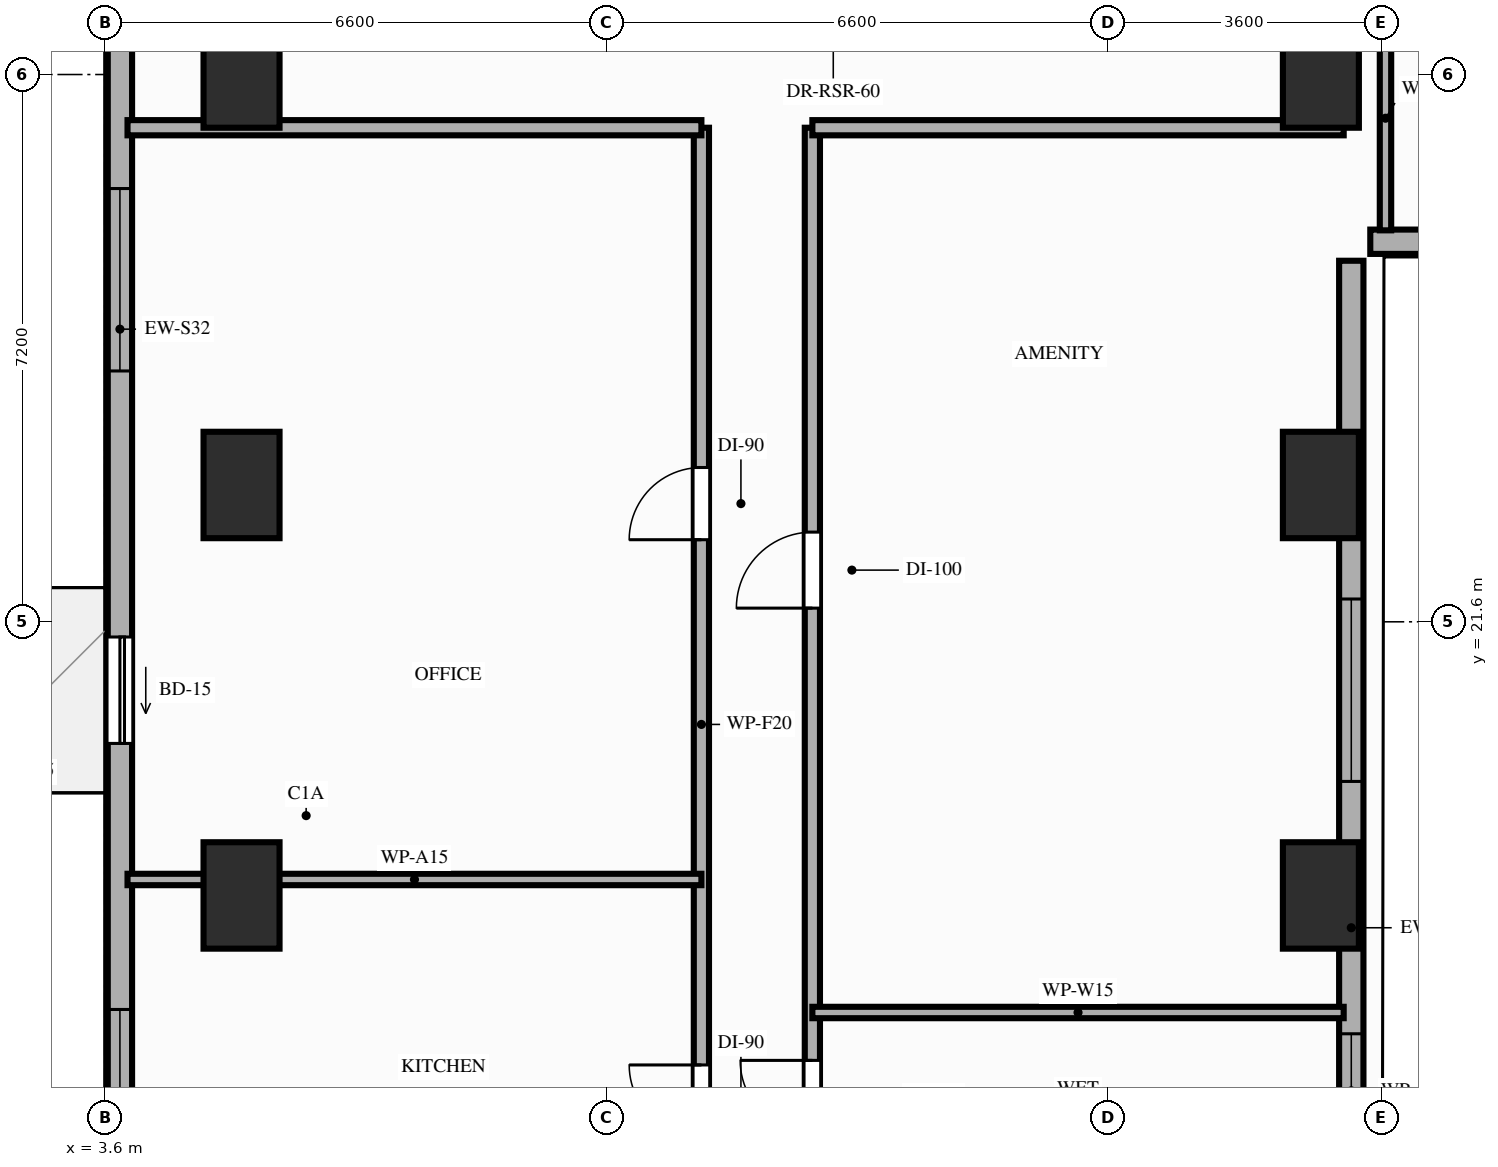
"""IFC4 building model, lengths in metres.
Left out: names, types, materials, properties, quantities, classifications, styles, units other than length and angle.
Written with IfcOpenShell. Run it as: python <this file> out.ifc"""

import sys

from ifc_helpers import new_model, si_unit, direction, frame, frame_2d, origin, origin_2d, place, context, subcontext, project, spatial, rectangle, extrude, element, fill, save


model = new_model("IFC4")
c1 = context("Model", 3, precision=1e-05, world=origin(), true_north=direction((0.0, 1.0)))
c2 = subcontext(c1, "Body", "Model", "MODEL_VIEW")
j1 = project(units=[si_unit("LENGTHUNIT", "METRE"), si_unit("PLANEANGLEUNIT", "RADIAN")], contexts=[c1])
p1 = place(None, origin())
s1 = spatial("IfcSite", under=j1, at=p1, CompositionType="ELEMENT")
p2 = place(p1, origin())
s2 = spatial("IfcBuilding", under=s1, at=p2, CompositionType="ELEMENT")
p3 = place(p2, frame((0.0, 0.0, 39.8)))
s3 = spatial("IfcBuildingStorey", under=s2, at=p3, CompositionType="ELEMENT", Elevation=39.8)
for number, where, z_axis, x_axis in (
    (1, (5.4, 18.0, 0.0), (0.0, 0.0, 1.0), (1.0, 0.0, 0.0)),
    (2, (19.6, 18.0, 0.0), (0.0, 0.0, 1.0), (1.0, 0.0, 0.0)),
    (3, (5.4, 23.4, 0.0), (0.0, 0.0, 1.0), (1.0, 0.0, 0.0)),
    (4, (19.6, 23.4, 0.0), (0.0, 0.0, 1.0), (1.0, 0.0, 0.0)),
    (5, (5.4, 28.8, 0.0), (0.0, 0.0, 1.0), (1.0, 0.0, 0.0)),
    (6, (19.6, 28.8, 0.0), (0.0, 0.0, 1.0), (1.0, 0.0, 0.0)),
):
    element("IfcColumn", number, at=place(p3, frame(where, z_axis=z_axis, x_axis=x_axis)), inside=s3, PredefinedType="COLUMN", context=c2, shape_type="SweptSolid", body=[
        extrude(rectangle(XDim=1.0, YDim=1.4, at=origin_2d()), origin(), (0.0, 0.0, 1.0), 3.8),
    ])
p4 = place(p3, frame((3.8, 42.1, 0.0), z_axis=(0.0, 0.0, 1.0), x_axis=(0.0, -1.0, 0.0)))
e7 = element("IfcWall", 7, at=p4, inside=s3, PredefinedType="STANDARD", context=c2, shape_type="SweptSolid", body=[
    extrude(rectangle(XDim=33.3, YDim=0.32, at=frame_2d((16.65, 0.0))), origin(), (0.0, 0.0, 1.0), 3.3),
])
p5 = place(p4, frame((20.7, 0.0, 0.0)))
e8 = element("IfcOpeningElement", 8, at=p5, cuts=e7, PredefinedType="OPENING", context=c2, shape_type="SweptSolid", body=[
    extrude(rectangle(XDim=1.4, YDim=2.1, at=frame_2d((0.7, 1.05))), frame((0.0, 0.17, 0.0), z_axis=(0.0, -1.0, 0.0), x_axis=(1.0, 0.0, 0.0)), (0.0, 0.0, 1.0), 0.34),
])
p6 = place(p4, frame((30.5, 0.0, 0.85)))
e9 = element("IfcOpeningElement", 9, at=p6, cuts=e7, PredefinedType="OPENING", context=c2, shape_type="SweptSolid", body=[
    extrude(rectangle(XDim=2.4, YDim=1.8, at=frame_2d((1.2, 0.9))), frame((0.0, 0.17, 0.0), z_axis=(0.0, -1.0, 0.0), x_axis=(1.0, 0.0, 0.0)), (0.0, 0.0, 1.0), 0.34),
])
p7 = place(p4, frame((25.6, 0.0, 0.85)))
e10 = element("IfcOpeningElement", 10, at=p7, cuts=e7, PredefinedType="OPENING", context=c2, shape_type="SweptSolid", body=[
    extrude(rectangle(XDim=2.4, YDim=1.8, at=frame_2d((1.2, 0.9))), frame((0.0, 0.17, 0.0), z_axis=(0.0, -1.0, 0.0), x_axis=(1.0, 0.0, 0.0)), (0.0, 0.0, 1.0), 0.34),
])
p8 = place(p4, frame((14.8, 0.0, 0.85)))
e11 = element("IfcOpeningElement", 11, at=p8, cuts=e7, PredefinedType="OPENING", context=c2, shape_type="SweptSolid", body=[
    extrude(rectangle(XDim=2.4, YDim=1.8, at=frame_2d((1.2, 0.9))), frame((0.0, 0.17, 0.0), z_axis=(0.0, -1.0, 0.0), x_axis=(1.0, 0.0, 0.0)), (0.0, 0.0, 1.0), 0.34),
])
p9 = place(p4, frame((9.6, 0.0, 0.85)))
e12 = element("IfcOpeningElement", 12, at=p9, cuts=e7, PredefinedType="OPENING", context=c2, shape_type="SweptSolid", body=[
    extrude(rectangle(XDim=2.4, YDim=1.8, at=frame_2d((1.2, 0.9))), frame((0.0, 0.17, 0.0), z_axis=(0.0, -1.0, 0.0), x_axis=(1.0, 0.0, 0.0)), (0.0, 0.0, 1.0), 0.34),
])
p10 = place(p4, frame((3.5, 0.0, 0.85)))
e13 = element("IfcOpeningElement", 13, at=p10, cuts=e7, PredefinedType="OPENING", context=c2, shape_type="SweptSolid", body=[
    extrude(rectangle(XDim=2.4, YDim=1.8, at=frame_2d((1.2, 0.9))), frame((0.0, 0.17, 0.0), z_axis=(0.0, -1.0, 0.0), x_axis=(1.0, 0.0, 0.0)), (0.0, 0.0, 1.0), 0.34),
])
p11 = place(p3, frame((20.0, 8.8, 0.0), z_axis=(0.0, 0.0, 1.0), x_axis=(0.0, 1.0, 0.0)))
e14 = element("IfcWall", 14, at=p11, inside=s3, PredefinedType="STANDARD", context=c2, shape_type="SweptSolid", body=[
    extrude(rectangle(XDim=17.55, YDim=0.32, at=frame_2d((8.775, 0.0))), origin(), (0.0, 0.0, 1.0), 3.0),
])
p12 = place(p11, frame((5.88, 0.0, 0.85)))
e15 = element("IfcOpeningElement", 15, at=p12, cuts=e14, PredefinedType="OPENING", context=c2, shape_type="SweptSolid", body=[
    extrude(rectangle(XDim=1.5, YDim=1.75, at=frame_2d((0.75, 0.875))), frame((0.0, 0.17, 0.0), z_axis=(0.0, -1.0, 0.0), x_axis=(1.0, 0.0, 0.0)), (0.0, 0.0, 1.0), 0.34),
])
p13 = place(p11, frame((10.7, 0.0, 0.85)))
e16 = element("IfcOpeningElement", 16, at=p13, cuts=e14, PredefinedType="OPENING", context=c2, shape_type="SweptSolid", body=[
    extrude(rectangle(XDim=2.4, YDim=1.8, at=frame_2d((1.2, 0.9))), frame((0.0, 0.17, 0.0), z_axis=(0.0, -1.0, 0.0), x_axis=(1.0, 0.0, 0.0)), (0.0, 0.0, 1.0), 0.34),
])
p14 = place(p3, frame((20.25, 26.6, 0.0), z_axis=(0.0, 0.0, 1.0), x_axis=(1.0, 0.0, 0.0)))
e17 = element("IfcWall", 17, at=p14, inside=s3, PredefinedType="STANDARD", context=c2, shape_type="SweptSolid", body=[
    extrude(rectangle(XDim=26.15, YDim=0.32, at=frame_2d((13.075, 0.0))), origin(), (0.0, 0.0, 1.0), 3.62),
])
p15 = place(p14, frame((7.95, 0.0, 0.0)))
e18 = element("IfcOpeningElement", 18, at=p15, cuts=e17, PredefinedType="OPENING", context=c2, shape_type="SweptSolid", body=[
    extrude(rectangle(XDim=1.4, YDim=2.1, at=frame_2d((0.7, 1.05))), frame((0.0, 0.17, 0.0), z_axis=(0.0, -1.0, 0.0), x_axis=(1.0, 0.0, 0.0)), (0.0, 0.0, 1.0), 0.34),
])
p16 = place(p14, frame((22.45, 0.0, 0.0)))
e19 = element("IfcOpeningElement", 19, at=p16, cuts=e17, PredefinedType="OPENING", context=c2, shape_type="SweptSolid", body=[
    extrude(rectangle(XDim=1.4, YDim=2.1, at=frame_2d((0.7, 1.05))), frame((0.0, 0.17, 0.0), z_axis=(0.0, -1.0, 0.0), x_axis=(1.0, 0.0, 0.0)), (0.0, 0.0, 1.0), 0.34),
])
p17 = place(p14, frame((1.95, 0.0, 0.85)))
e20 = element("IfcOpeningElement", 20, at=p17, cuts=e17, PredefinedType="OPENING", context=c2, shape_type="SweptSolid", body=[
    extrude(rectangle(XDim=2.4, YDim=1.8, at=frame_2d((1.2, 0.9))), frame((0.0, 0.17, 0.0), z_axis=(0.0, -1.0, 0.0), x_axis=(1.0, 0.0, 0.0)), (0.0, 0.0, 1.0), 0.34),
])
p18 = place(p3, frame((11.45, 12.4, 0.0), z_axis=(0.0, 0.0, 1.0), x_axis=(0.0, 1.0, 0.0)))
e21 = element("IfcWall", 21, at=p18, inside=s3, PredefinedType="PARTITIONING", context=c2, shape_type="SweptSolid", body=[
    extrude(rectangle(XDim=15.7, YDim=0.2, at=frame_2d((7.85, 0.0))), origin(), (0.0, 0.0, 1.0), 3.0),
])
p19 = place(p18, frame((2.42, 0.0, 0.0)))
e22 = element("IfcOpeningElement", 22, at=p19, cuts=e21, PredefinedType="OPENING", context=c2, shape_type="SweptSolid", body=[
    extrude(rectangle(XDim=0.95, YDim=2.15, at=frame_2d((0.475, 1.075))), frame((0.0, 0.11, 0.0), z_axis=(0.0, -1.0, 0.0), x_axis=(1.0, 0.0, 0.0)), (0.0, 0.0, 1.0), 0.22),
])
p20 = place(p18, frame((10.28, 0.0, 0.0)))
e23 = element("IfcOpeningElement", 23, at=p20, cuts=e21, PredefinedType="OPENING", context=c2, shape_type="SweptSolid", body=[
    extrude(rectangle(XDim=0.95, YDim=2.15, at=frame_2d((0.475, 1.075))), frame((0.0, 0.11, 0.0), z_axis=(0.0, -1.0, 0.0), x_axis=(1.0, 0.0, 0.0)), (0.0, 0.0, 1.0), 0.22),
])
p21 = place(p3, frame((12.91, 12.4, 0.0), z_axis=(0.0, 0.0, 1.0), x_axis=(0.0, 1.0, 0.0)))
e24 = element("IfcWall", 24, at=p21, inside=s3, PredefinedType="PARTITIONING", context=c2, shape_type="SweptSolid", body=[
    extrude(rectangle(XDim=15.7, YDim=0.2, at=frame_2d((7.85, 0.0))), origin(), (0.0, 0.0, 1.0), 3.0),
])
p22 = place(p21, frame((0.45, 0.0, 0.0)))
e25 = element("IfcOpeningElement", 25, at=p22, cuts=e24, PredefinedType="OPENING", context=c2, shape_type="SweptSolid", body=[
    extrude(rectangle(XDim=0.85, YDim=2.1, at=frame_2d((0.425, 1.05))), frame((0.0, 0.11, 0.0), z_axis=(0.0, -1.0, 0.0), x_axis=(1.0, 0.0, 0.0)), (0.0, 0.0, 1.0), 0.22),
])
p23 = place(p21, frame((2.48, 0.0, 0.0)))
e26 = element("IfcOpeningElement", 26, at=p23, cuts=e24, PredefinedType="OPENING", context=c2, shape_type="SweptSolid", body=[
    extrude(rectangle(XDim=0.95, YDim=2.1, at=frame_2d((0.475, 1.05))), frame((0.0, 0.11, 0.0), z_axis=(0.0, -1.0, 0.0), x_axis=(1.0, 0.0, 0.0)), (0.0, 0.0, 1.0), 0.22),
])
p24 = place(p21, frame((9.38, 0.0, 0.0)))
e27 = element("IfcOpeningElement", 27, at=p24, cuts=e24, PredefinedType="OPENING", context=c2, shape_type="SweptSolid", body=[
    extrude(rectangle(XDim=1.0, YDim=2.15, at=frame_2d((0.5, 1.075))), frame((0.0, 0.11, 0.0), z_axis=(0.0, -1.0, 0.0), x_axis=(1.0, 0.0, 0.0)), (0.0, 0.0, 1.0), 0.22),
])
p25 = place(p3, frame((3.9, 28.1, 0.0), z_axis=(0.0, 0.0, 1.0), x_axis=(1.0, 0.0, 0.0)))
e28 = element("IfcWall", 28, at=p25, inside=s3, PredefinedType="PARTITIONING", context=c2, shape_type="SweptSolid", body=[
    extrude(rectangle(XDim=7.55, YDim=0.2, at=frame_2d((3.775, 0.0))), origin(), (0.0, 0.0, 1.0), 3.0),
])
p26 = place(p3, frame((12.91, 28.1, 0.0), z_axis=(0.0, 0.0, 1.0), x_axis=(1.0, 0.0, 0.0)))
e29 = element("IfcWall", 29, at=p26, inside=s3, PredefinedType="PARTITIONING", context=c2, shape_type="SweptSolid", body=[
    extrude(rectangle(XDim=6.99, YDim=0.2, at=frame_2d((3.495, 0.0))), origin(), (0.0, 0.0, 1.0), 3.0),
])
p27 = place(p3, frame((20.45, 26.75, 0.0), z_axis=(0.0, 0.0, 1.0), x_axis=(0.0, 1.0, 0.0)))
e30 = element("IfcWall", 30, at=p27, inside=s3, PredefinedType="PARTITIONING", context=c2, shape_type="SweptSolid", body=[
    extrude(rectangle(XDim=2.95, YDim=0.15, at=frame_2d((1.475, 0.0))), origin(), (0.0, 0.0, 1.0), 3.0),
])
p28 = place(p3, frame((3.9, 18.21, 0.0), z_axis=(0.0, 0.0, 1.0), x_axis=(1.0, 0.0, 0.0)))
e31 = element("IfcWall", 31, at=p28, inside=s3, PredefinedType="PARTITIONING", context=c2, shape_type="SweptSolid", body=[
    extrude(rectangle(XDim=7.55, YDim=0.15, at=frame_2d((3.775, 0.0))), origin(), (0.0, 0.0, 1.0), 3.0),
])
p29 = place(p3, frame((12.91, 16.46, 0.0), z_axis=(0.0, 0.0, 1.0), x_axis=(1.0, 0.0, 0.0)))
e32 = element("IfcWall", 32, at=p29, inside=s3, PredefinedType="PARTITIONING", context=c2, shape_type="SweptSolid", body=[
    extrude(rectangle(XDim=6.99, YDim=0.15, at=frame_2d((3.495, 0.0))), origin(), (0.0, 0.0, 1.0), 3.0),
])
p30 = place(p5, origin())
e33 = element("IfcDoor", 33, at=p30, inside=s3, OperationType="SLIDING_TO_RIGHT", PredefinedType="DOOR", context=c2, shape_type="SweptSolid", body=[
    extrude(rectangle(XDim=1.4, YDim=2.1, at=frame_2d((0.7, 1.05))), frame((0.0, 0.025, 0.0), z_axis=(0.0, -1.0, 0.0), x_axis=(1.0, 0.0, 0.0)), (0.0, 0.0, 1.0), 0.05),
])
fill(e8, e33)
p31 = place(p7, origin())
e34 = element("IfcWindow", 34, at=p31, inside=s3, PartitioningType="SINGLE_PANEL", PredefinedType="WINDOW", context=c2, shape_type="SweptSolid", body=[
    extrude(rectangle(XDim=2.4, YDim=1.8, at=frame_2d((1.2, 0.9))), frame((0.0, 0.03, 0.0), z_axis=(0.0, -1.0, 0.0), x_axis=(1.0, 0.0, 0.0)), (0.0, 0.0, 1.0), 0.06),
])
fill(e10, e34)
p32 = place(p8, origin())
e35 = element("IfcWindow", 35, at=p32, inside=s3, PartitioningType="SINGLE_PANEL", PredefinedType="WINDOW", context=c2, shape_type="SweptSolid", body=[
    extrude(rectangle(XDim=2.4, YDim=1.8, at=frame_2d((1.2, 0.9))), frame((0.0, 0.03, 0.0), z_axis=(0.0, -1.0, 0.0), x_axis=(1.0, 0.0, 0.0)), (0.0, 0.0, 1.0), 0.06),
])
fill(e11, e35)
p33 = place(p12, origin())
e36 = element("IfcWindow", 36, at=p33, inside=s3, PartitioningType="SINGLE_PANEL", PredefinedType="WINDOW", context=c2, shape_type="SweptSolid", body=[
    extrude(rectangle(XDim=1.5, YDim=1.75, at=frame_2d((0.75, 0.875))), frame((0.0, 0.03, 0.0), z_axis=(0.0, -1.0, 0.0), x_axis=(1.0, 0.0, 0.0)), (0.0, 0.0, 1.0), 0.06),
])
fill(e15, e36)
p34 = place(p13, origin())
e37 = element("IfcWindow", 37, at=p34, inside=s3, PartitioningType="SINGLE_PANEL", PredefinedType="WINDOW", context=c2, shape_type="SweptSolid", body=[
    extrude(rectangle(XDim=2.4, YDim=1.8, at=frame_2d((1.2, 0.9))), frame((0.0, 0.03, 0.0), z_axis=(0.0, -1.0, 0.0), x_axis=(1.0, 0.0, 0.0)), (0.0, 0.0, 1.0), 0.06),
])
fill(e16, e37)
p35 = place(p19, origin())
e38 = element("IfcDoor", 38, at=p35, inside=s3, OperationType="SINGLE_SWING_RIGHT", PredefinedType="DOOR", context=c2, shape_type="SweptSolid", body=[
    extrude(rectangle(XDim=0.95, YDim=2.15, at=frame_2d((0.475, 1.075))), frame((0.0, 0.025, 0.0), z_axis=(0.0, -1.0, 0.0), x_axis=(1.0, 0.0, 0.0)), (0.0, 0.0, 1.0), 0.05),
])
fill(e22, e38)
p36 = place(p20, origin())
e39 = element("IfcDoor", 39, at=p36, inside=s3, OperationType="SINGLE_SWING_LEFT", PredefinedType="DOOR", context=c2, shape_type="SweptSolid", body=[
    extrude(rectangle(XDim=0.95, YDim=2.15, at=frame_2d((0.475, 1.075))), frame((0.0, 0.025, 0.0), z_axis=(0.0, -1.0, 0.0), x_axis=(1.0, 0.0, 0.0)), (0.0, 0.0, 1.0), 0.05),
])
fill(e23, e39)
p37 = place(p23, origin())
e40 = element("IfcDoor", 40, at=p37, inside=s3, OperationType="SINGLE_SWING_RIGHT", PredefinedType="DOOR", context=c2, shape_type="SweptSolid", body=[
    extrude(rectangle(XDim=0.95, YDim=2.1, at=frame_2d((0.475, 1.05))), frame((0.0, 0.025, 0.0), z_axis=(0.0, -1.0, 0.0), x_axis=(1.0, 0.0, 0.0)), (0.0, 0.0, 1.0), 0.05),
])
fill(e26, e40)
p38 = place(p24, origin())
e41 = element("IfcDoor", 41, at=p38, inside=s3, OperationType="SINGLE_SWING_LEFT", PredefinedType="DOOR", context=c2, shape_type="SweptSolid", body=[
    extrude(rectangle(XDim=1.0, YDim=2.15, at=frame_2d((0.5, 1.075))), frame((0.0, 0.025, 0.0), z_axis=(0.0, -1.0, 0.0), x_axis=(1.0, 0.0, 0.0)), (0.0, 0.0, 1.0), 0.05),
])
fill(e27, e41)
save(model, sys.argv[1])
